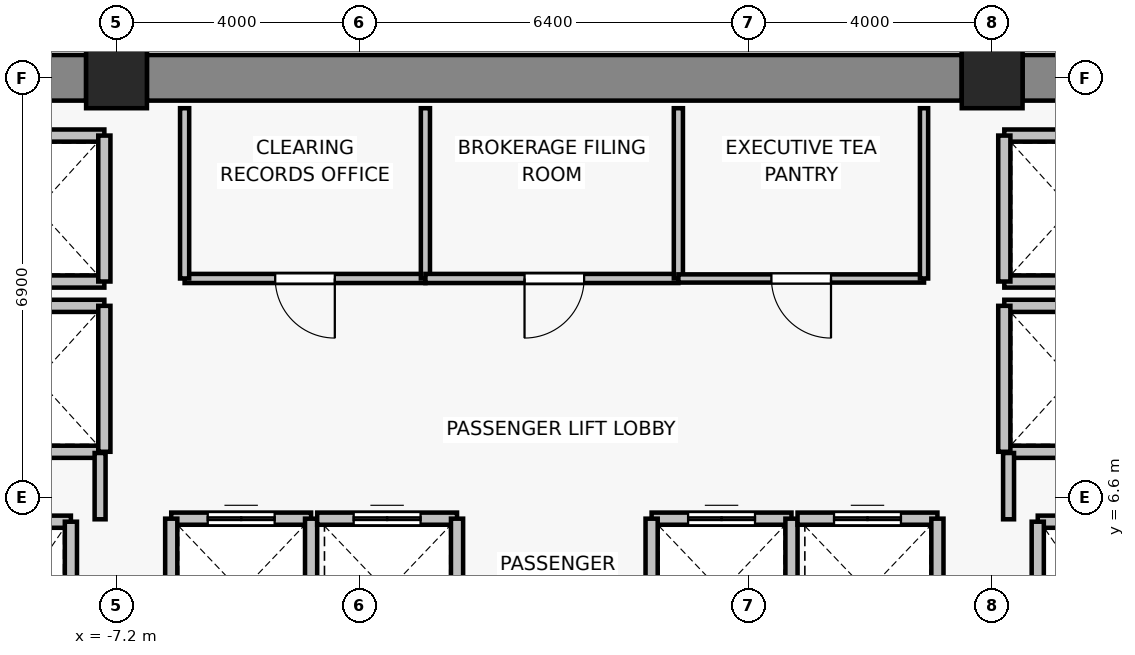
"""IFC4 building model, lengths in metres.
Left out: names, types, materials, properties, quantities, classifications, styles, units other than length and angle.
Written with IfcOpenShell. Run it as: python <this file> out.ifc"""

import sys

from ifc_helpers import new_model, si_unit, direction, frame, frame_2d, origin, origin_2d, place, context, subcontext, project, spatial, rectangle, extrude, source, transform, mapped, element, fill, save


model = new_model("IFC4")
c1 = context("Model", 3, precision=1e-05, world=origin(), true_north=direction((0.0, 1.0)))
c2 = subcontext(c1, "Body", "Model", "MODEL_VIEW")
j1 = project(units=[si_unit("LENGTHUNIT", "METRE"), si_unit("PLANEANGLEUNIT", "RADIAN")], contexts=[c1])
p1 = place(None, origin())
s1 = spatial("IfcSite", under=j1, at=p1, CompositionType="ELEMENT")
p2 = place(p1, origin())
s2 = spatial("IfcBuilding", under=s1, at=p2, CompositionType="ELEMENT")
p3 = place(p2, frame((0.0, 0.0, 175.9)))
s3 = spatial("IfcBuildingStorey", under=s2, at=p3, CompositionType="ELEMENT", Elevation=175.9)
for number, where, z_axis, x_axis in (
    (1, (-7.2, 13.5, 0.0), (0.0, 0.0, 1.0), (1.0, 0.0, 0.0)),
    (2, (7.2, 13.5, 0.0), (0.0, 0.0, 1.0), (1.0, 0.0, 0.0)),
):
    element("IfcColumn", number, at=place(p3, frame(where, z_axis=z_axis, x_axis=x_axis)), inside=s3, PredefinedType="COLUMN", context=c2, shape_type="SweptSolid", body=[
        extrude(rectangle(XDim=1.0, YDim=1.0, at=origin_2d()), origin(), (0.0, 0.0, 1.0), 3.3),
    ])
p4 = place(p3, frame((-13.9, 13.5, 0.0), z_axis=(0.0, 0.0, 1.0), x_axis=(1.0, 0.0, 0.0)))
e3 = element("IfcWall", 3, at=p4, inside=s3, PredefinedType="SHEAR", context=c2, shape_type="SweptSolid", body=[
    extrude(rectangle(XDim=6.2, YDim=0.75, at=frame_2d((3.1, 0.0))), origin(), (0.0, 0.0, 1.0), 3.075),
])
p5 = place(p3, frame((-6.7, 13.5, 0.0), z_axis=(0.0, 0.0, 1.0), x_axis=(1.0, 0.0, 0.0)))
e4 = element("IfcWall", 4, at=p5, inside=s3, PredefinedType="SHEAR", context=c2, shape_type="SweptSolid", body=[
    extrude(rectangle(XDim=13.4, YDim=0.75, at=frame_2d((6.7, 0.0))), origin(), (0.0, 0.0, 1.0), 3.075),
])
p6 = place(p3, frame((7.7, 13.5, 0.0), z_axis=(0.0, 0.0, 1.0), x_axis=(1.0, 0.0, 0.0)))
e5 = element("IfcWall", 5, at=p6, inside=s3, PredefinedType="SHEAR", context=c2, shape_type="SweptSolid", body=[
    extrude(rectangle(XDim=6.2, YDim=0.75, at=frame_2d((3.1, 0.0))), origin(), (0.0, 0.0, 1.0), 3.075),
])
p7 = place(p3, frame((-9.95, 6.2, 0.0), z_axis=(0.0, 0.0, 1.0), x_axis=(1.0, 0.0, 0.0)))
e6 = element("IfcWall", 6, at=p7, inside=s3, PredefinedType="SOLIDWALL", context=c2, shape_type="SweptSolid", body=[
    extrude(rectangle(XDim=2.0, YDim=0.2, at=frame_2d((1.0, 0.0))), origin(), (0.0, 0.0, 1.0), 3.075),
])
p8 = place(p3, frame((-7.95, 6.2, 0.0), z_axis=(0.0, 0.0, 1.0), x_axis=(0.0, -1.0, 0.0)))
e7 = element("IfcWall", 7, at=p8, inside=s3, PredefinedType="SOLIDWALL", context=c2, shape_type="SweptSolid", body=[
    extrude(rectangle(XDim=2.8, YDim=0.2, at=frame_2d((1.4, 0.0))), origin(), (0.0, 0.0, 1.0), 3.075),
])
p9 = place(p3, frame((7.95, 6.2, 0.0), z_axis=(0.0, 0.0, 1.0), x_axis=(1.0, 0.0, 0.0)))
e8 = element("IfcWall", 8, at=p9, inside=s3, PredefinedType="SOLIDWALL", context=c2, shape_type="SweptSolid", body=[
    extrude(rectangle(XDim=2.0, YDim=0.2, at=frame_2d((1.0, 0.0))), origin(), (0.0, 0.0, 1.0), 3.075),
])
p10 = place(p3, frame((7.95, 3.4, 0.0), z_axis=(0.0, 0.0, 1.0), x_axis=(0.0, 1.0, 0.0)))
e9 = element("IfcWall", 9, at=p10, inside=s3, PredefinedType="SOLIDWALL", context=c2, shape_type="SweptSolid", body=[
    extrude(rectangle(XDim=2.8, YDim=0.2, at=frame_2d((1.4, 0.0))), origin(), (0.0, 0.0, 1.0), 3.075),
])
p11 = place(p3, frame((-6.3, 6.25, 0.0), z_axis=(0.0, 0.0, 1.0), x_axis=(1.0, 0.0, 0.0)))
e10 = element("IfcWall", 10, at=p11, inside=s3, PredefinedType="SOLIDWALL", context=c2, shape_type="SweptSolid", body=[
    extrude(rectangle(XDim=2.3, YDim=0.2, at=frame_2d((1.15, 0.0))), origin(), (0.0, 0.0, 1.0), 3.075),
])
p12 = place(p11, frame((0.6, 0.0, 0.0)))
e11 = element("IfcOpeningElement", 11, at=p12, cuts=e10, PredefinedType="OPENING", context=c2, shape_type="SweptSolid", body=[
    extrude(rectangle(XDim=1.1, YDim=2.2, at=frame_2d((0.55, 1.1))), frame((0.0, 0.11, 0.0), z_axis=(0.0, -1.0, 0.0), x_axis=(1.0, 0.0, 0.0)), (0.0, 0.0, 1.0), 0.22),
])
for number, where, z_axis, x_axis in (
    (12, (-6.3, 3.85, 0.0), (0.0, 0.0, 1.0), (0.0, 1.0, 0.0)),
    (13, (-4.0, 6.25, 0.0), (0.0, 0.0, 1.0), (0.0, -1.0, 0.0)),
):
    element("IfcWall", number, at=place(p3, frame(where, z_axis=z_axis, x_axis=x_axis)), inside=s3, PredefinedType="SOLIDWALL", context=c2, shape_type="SweptSolid", body=[
        extrude(rectangle(XDim=2.4, YDim=0.2, at=frame_2d((1.2, 0.0))), origin(), (0.0, 0.0, 1.0), 3.075),
    ])
p13 = place(p3, frame((-3.9, 6.25, 0.0), z_axis=(0.0, 0.0, 1.0), x_axis=(1.0, 0.0, 0.0)))
e14 = element("IfcWall", 14, at=p13, inside=s3, PredefinedType="SOLIDWALL", context=c2, shape_type="SweptSolid", body=[
    extrude(rectangle(XDim=2.3, YDim=0.2, at=frame_2d((1.15, 0.0))), origin(), (0.0, 0.0, 1.0), 3.075),
])
p14 = place(p13, frame((0.6, 0.0, 0.0)))
e15 = element("IfcOpeningElement", 15, at=p14, cuts=e14, PredefinedType="OPENING", context=c2, shape_type="SweptSolid", body=[
    extrude(rectangle(XDim=1.1, YDim=2.2, at=frame_2d((0.55, 1.1))), frame((0.0, 0.11, 0.0), z_axis=(0.0, -1.0, 0.0), x_axis=(1.0, 0.0, 0.0)), (0.0, 0.0, 1.0), 0.22),
])
p15 = place(p3, frame((-1.6, 6.25, 0.0), z_axis=(0.0, 0.0, 1.0), x_axis=(0.0, -1.0, 0.0)))
e16 = element("IfcWall", 16, at=p15, inside=s3, PredefinedType="SOLIDWALL", context=c2, shape_type="SweptSolid", body=[
    extrude(rectangle(XDim=2.4, YDim=0.2, at=frame_2d((1.2, 0.0))), origin(), (0.0, 0.0, 1.0), 3.075),
])
p16 = place(p3, frame((1.6, 6.25, 0.0), z_axis=(0.0, 0.0, 1.0), x_axis=(1.0, 0.0, 0.0)))
e17 = element("IfcWall", 17, at=p16, inside=s3, PredefinedType="SOLIDWALL", context=c2, shape_type="SweptSolid", body=[
    extrude(rectangle(XDim=2.3, YDim=0.2, at=frame_2d((1.15, 0.0))), origin(), (0.0, 0.0, 1.0), 3.075),
])
p17 = place(p16, frame((0.6, 0.0, 0.0)))
e18 = element("IfcOpeningElement", 18, at=p17, cuts=e17, PredefinedType="OPENING", context=c2, shape_type="SweptSolid", body=[
    extrude(rectangle(XDim=1.1, YDim=2.2, at=frame_2d((0.55, 1.1))), frame((0.0, 0.11, 0.0), z_axis=(0.0, -1.0, 0.0), x_axis=(1.0, 0.0, 0.0)), (0.0, 0.0, 1.0), 0.22),
])
for number, where, z_axis, x_axis in (
    (19, (1.6, 3.85, 0.0), (0.0, 0.0, 1.0), (0.0, 1.0, 0.0)),
    (20, (3.9, 6.25, 0.0), (0.0, 0.0, 1.0), (0.0, -1.0, 0.0)),
):
    element("IfcWall", number, at=place(p3, frame(where, z_axis=z_axis, x_axis=x_axis)), inside=s3, PredefinedType="SOLIDWALL", context=c2, shape_type="SweptSolid", body=[
        extrude(rectangle(XDim=2.4, YDim=0.2, at=frame_2d((1.2, 0.0))), origin(), (0.0, 0.0, 1.0), 3.075),
    ])
p18 = place(p3, frame((4.0, 6.25, 0.0), z_axis=(0.0, 0.0, 1.0), x_axis=(1.0, 0.0, 0.0)))
e21 = element("IfcWall", 21, at=p18, inside=s3, PredefinedType="SOLIDWALL", context=c2, shape_type="SweptSolid", body=[
    extrude(rectangle(XDim=2.3, YDim=0.2, at=frame_2d((1.15, 0.0))), origin(), (0.0, 0.0, 1.0), 3.075),
])
p19 = place(p18, frame((0.6, 0.0, 0.0)))
e22 = element("IfcOpeningElement", 22, at=p19, cuts=e21, PredefinedType="OPENING", context=c2, shape_type="SweptSolid", body=[
    extrude(rectangle(XDim=1.1, YDim=2.2, at=frame_2d((0.55, 1.1))), frame((0.0, 0.11, 0.0), z_axis=(0.0, -1.0, 0.0), x_axis=(1.0, 0.0, 0.0)), (0.0, 0.0, 1.0), 0.22),
])
p20 = place(p3, frame((6.3, 6.25, 0.0), z_axis=(0.0, 0.0, 1.0), x_axis=(0.0, -1.0, 0.0)))
e23 = element("IfcWall", 23, at=p20, inside=s3, PredefinedType="SOLIDWALL", context=c2, shape_type="SweptSolid", body=[
    extrude(rectangle(XDim=2.4, YDim=0.2, at=frame_2d((1.2, 0.0))), origin(), (0.0, 0.0, 1.0), 3.075),
])
for number, where, z_axis, x_axis in (
    (24, (-7.4, 7.35, 0.0), (0.0, 0.0, 1.0), (-1.0, 0.0, 0.0)),
    (25, (-9.6, 9.75, 0.0), (0.0, 0.0, 1.0), (1.0, 0.0, 0.0)),
):
    element("IfcWall", number, at=place(p3, frame(where, z_axis=z_axis, x_axis=x_axis)), inside=s3, PredefinedType="SOLIDWALL", context=c2, shape_type="SweptSolid", body=[
        extrude(rectangle(XDim=2.2, YDim=0.2, at=frame_2d((1.1, 0.0))), origin(), (0.0, 0.0, 1.0), 2.565),
    ])
p21 = place(p3, frame((-7.4, 9.75, 0.0), z_axis=(0.0, 0.0, 1.0), x_axis=(0.0, -1.0, 0.0)))
e26 = element("IfcWall", 26, at=p21, inside=s3, PredefinedType="SOLIDWALL", context=c2, shape_type="SweptSolid", body=[
    extrude(rectangle(XDim=2.4, YDim=0.2, at=frame_2d((1.2, 0.0))), origin(), (0.0, 0.0, 1.0), 2.565),
])
for number, where, z_axis, x_axis in (
    (27, (-7.4, 10.15, 0.0), (0.0, 0.0, 1.0), (-1.0, 0.0, 0.0)),
    (28, (-9.6, 12.55, 0.0), (0.0, 0.0, 1.0), (1.0, 0.0, 0.0)),
):
    element("IfcWall", number, at=place(p3, frame(where, z_axis=z_axis, x_axis=x_axis)), inside=s3, PredefinedType="SOLIDWALL", context=c2, shape_type="SweptSolid", body=[
        extrude(rectangle(XDim=2.2, YDim=0.2, at=frame_2d((1.1, 0.0))), origin(), (0.0, 0.0, 1.0), 2.565),
    ])
p22 = place(p3, frame((-7.4, 12.55, 0.0), z_axis=(0.0, 0.0, 1.0), x_axis=(0.0, -1.0, 0.0)))
e29 = element("IfcWall", 29, at=p22, inside=s3, PredefinedType="SOLIDWALL", context=c2, shape_type="SweptSolid", body=[
    extrude(rectangle(XDim=2.4, YDim=0.2, at=frame_2d((1.2, 0.0))), origin(), (0.0, 0.0, 1.0), 2.565),
])
for number, where, z_axis, x_axis in (
    (30, (9.6, 7.35, 0.0), (0.0, 0.0, 1.0), (-1.0, 0.0, 0.0)),
    (31, (7.4, 9.75, 0.0), (0.0, 0.0, 1.0), (1.0, 0.0, 0.0)),
):
    element("IfcWall", number, at=place(p3, frame(where, z_axis=z_axis, x_axis=x_axis)), inside=s3, PredefinedType="SOLIDWALL", context=c2, shape_type="SweptSolid", body=[
        extrude(rectangle(XDim=2.2, YDim=0.2, at=frame_2d((1.1, 0.0))), origin(), (0.0, 0.0, 1.0), 2.565),
    ])
p23 = place(p3, frame((7.4, 7.35, 0.0), z_axis=(0.0, 0.0, 1.0), x_axis=(0.0, 1.0, 0.0)))
e32 = element("IfcWall", 32, at=p23, inside=s3, PredefinedType="SOLIDWALL", context=c2, shape_type="SweptSolid", body=[
    extrude(rectangle(XDim=2.4, YDim=0.2, at=frame_2d((1.2, 0.0))), origin(), (0.0, 0.0, 1.0), 2.565),
])
for number, where, z_axis, x_axis in (
    (33, (9.6, 10.15, 0.0), (0.0, 0.0, 1.0), (-1.0, 0.0, 0.0)),
    (34, (7.4, 12.55, 0.0), (0.0, 0.0, 1.0), (1.0, 0.0, 0.0)),
):
    element("IfcWall", number, at=place(p3, frame(where, z_axis=z_axis, x_axis=x_axis)), inside=s3, PredefinedType="SOLIDWALL", context=c2, shape_type="SweptSolid", body=[
        extrude(rectangle(XDim=2.2, YDim=0.2, at=frame_2d((1.1, 0.0))), origin(), (0.0, 0.0, 1.0), 2.565),
    ])
p24 = place(p3, frame((7.4, 10.15, 0.0), z_axis=(0.0, 0.0, 1.0), x_axis=(0.0, 1.0, 0.0)))
e35 = element("IfcWall", 35, at=p24, inside=s3, PredefinedType="SOLIDWALL", context=c2, shape_type="SweptSolid", body=[
    extrude(rectangle(XDim=2.4, YDim=0.2, at=frame_2d((1.2, 0.0))), origin(), (0.0, 0.0, 1.0), 2.565),
])
for number, where, z_axis, x_axis in (
    (36, (-7.47, 7.33, 0.0), (0.0, 0.0, 1.0), (0.0, -1.0, 0.0)),
    (37, (7.47, 6.24, 0.0), (0.0, 0.0, 1.0), (0.0, 1.0, 0.0)),
):
    element("IfcWall", number, at=place(p3, frame(where, z_axis=z_axis, x_axis=x_axis)), inside=s3, PredefinedType="PARTITIONING", context=c2, shape_type="SweptSolid", body=[
        extrude(rectangle(XDim=1.09, YDim=0.18, at=frame_2d((0.545, 0.0))), origin(), (0.0, 0.0, 1.0), 2.565),
    ])
p25 = place(p3, frame((-2.12, 10.2, 0.0), z_axis=(0.0, 0.0, 1.0), x_axis=(-1.0, 0.0, 0.0)))
e38 = element("IfcWall", 38, at=p25, inside=s3, PredefinedType="PARTITIONING", context=c2, shape_type="SweptSolid", body=[
    extrude(rectangle(XDim=3.96, YDim=0.15, at=frame_2d((1.98, 0.0))), origin(), (0.0, 0.0, 1.0), 3.075),
])
p26 = place(p25, frame((1.49, 0.0, 0.0)))
e39 = element("IfcOpeningElement", 39, at=p26, cuts=e38, PredefinedType="OPENING", context=c2, shape_type="SweptSolid", body=[
    extrude(rectangle(XDim=0.98, YDim=2.15, at=frame_2d((0.49, 1.075))), frame((0.0, 0.085, 0.0), z_axis=(0.0, -1.0, 0.0), x_axis=(1.0, 0.0, 0.0)), (0.0, 0.0, 1.0), 0.17),
])
for number, where, z_axis, x_axis in (
    (40, (-6.08, 10.2, 0.0), (0.0, 0.0, 1.0), (0.0, 1.0, 0.0)),
    (41, (-2.12, 13.0, 0.0), (0.0, 0.0, 1.0), (0.0, -1.0, 0.0)),
):
    element("IfcWall", number, at=place(p3, frame(where, z_axis=z_axis, x_axis=x_axis)), inside=s3, PredefinedType="PARTITIONING", context=c2, shape_type="SweptSolid", body=[
        extrude(rectangle(XDim=2.8, YDim=0.15, at=frame_2d((1.4, 0.0))), origin(), (0.0, 0.0, 1.0), 3.075),
    ])
p27 = place(p3, frame((2.04, 10.2, 0.0), z_axis=(0.0, 0.0, 1.0), x_axis=(-1.0, 0.0, 0.0)))
e42 = element("IfcWall", 42, at=p27, inside=s3, PredefinedType="PARTITIONING", context=c2, shape_type="SweptSolid", body=[
    extrude(rectangle(XDim=4.16, YDim=0.15, at=frame_2d((2.08, 0.0))), origin(), (0.0, 0.0, 1.0), 3.075),
])
p28 = place(p27, frame((1.55, 0.0, 0.0)))
e43 = element("IfcOpeningElement", 43, at=p28, cuts=e42, PredefinedType="OPENING", context=c2, shape_type="SweptSolid", body=[
    extrude(rectangle(XDim=0.98, YDim=2.15, at=frame_2d((0.49, 1.075))), frame((0.0, 0.085, 0.0), z_axis=(0.0, -1.0, 0.0), x_axis=(1.0, 0.0, 0.0)), (0.0, 0.0, 1.0), 0.17),
])
p29 = place(p3, frame((2.04, 13.0, 0.0), z_axis=(0.0, 0.0, 1.0), x_axis=(0.0, -1.0, 0.0)))
e44 = element("IfcWall", 44, at=p29, inside=s3, PredefinedType="PARTITIONING", context=c2, shape_type="SweptSolid", body=[
    extrude(rectangle(XDim=2.8, YDim=0.15, at=frame_2d((1.4, 0.0))), origin(), (0.0, 0.0, 1.0), 3.075),
])
p30 = place(p3, frame((6.08, 10.2, 0.0), z_axis=(0.0, 0.0, 1.0), x_axis=(-1.0, 0.0, 0.0)))
e45 = element("IfcWall", 45, at=p30, inside=s3, PredefinedType="PARTITIONING", context=c2, shape_type="SweptSolid", body=[
    extrude(rectangle(XDim=4.04, YDim=0.135, at=frame_2d((2.02, 0.0))), origin(), (0.0, 0.0, 1.0), 3.075),
])
p31 = place(p30, frame((1.53, 0.0, 0.0)))
e46 = element("IfcOpeningElement", 46, at=p31, cuts=e45, PredefinedType="OPENING", context=c2, shape_type="SweptSolid", body=[
    extrude(rectangle(XDim=0.98, YDim=2.15, at=frame_2d((0.49, 1.075))), frame((0.0, 0.077, 0.0), z_axis=(0.0, -1.0, 0.0), x_axis=(1.0, 0.0, 0.0)), (0.0, 0.0, 1.0), 0.155),
])
p32 = place(p3, frame((6.08, 13.0, 0.0), z_axis=(0.0, 0.0, 1.0), x_axis=(0.0, -1.0, 0.0)))
e47 = element("IfcWall", 47, at=p32, inside=s3, PredefinedType="PARTITIONING", context=c2, shape_type="SweptSolid", body=[
    extrude(rectangle(XDim=2.8, YDim=0.135, at=frame_2d((1.4, 0.0))), origin(), (0.0, 0.0, 1.0), 3.075),
])
m1 = source(origin(), c2, "Body", "SweptSolid", [
    extrude(rectangle(XDim=1.1, YDim=2.2, at=frame_2d((0.55, 1.1))), frame((0.0, 0.025, 0.0), z_axis=(0.0, -1.0, 0.0), x_axis=(1.0, 0.0, 0.0)), (0.0, 0.0, 1.0), 0.05),
])
p33 = place(p12, origin())
e48 = element("IfcDoor", 48, at=p33, inside=s3, OperationType="DOUBLE_DOOR_SLIDING", PredefinedType="DOOR", context=c2, shape_type="MappedRepresentation", body=[
    mapped(m1, transform((0.0, 0.0, 0.0), x_axis=(1.0, 0.0, 0.0), y_axis=(0.0, 1.0, 0.0), z_axis=(0.0, 0.0, 1.0), scale=1.0)),
])
fill(e11, e48)
p34 = place(p14, origin())
e49 = element("IfcDoor", 49, at=p34, inside=s3, OperationType="DOUBLE_DOOR_SLIDING", PredefinedType="DOOR", context=c2, shape_type="MappedRepresentation", body=[
    mapped(m1, transform((0.0, 0.0, 0.0), x_axis=(1.0, 0.0, 0.0), y_axis=(0.0, 1.0, 0.0), z_axis=(0.0, 0.0, 1.0), scale=1.0)),
])
fill(e15, e49)
p35 = place(p17, origin())
e50 = element("IfcDoor", 50, at=p35, inside=s3, OperationType="DOUBLE_DOOR_SLIDING", PredefinedType="DOOR", context=c2, shape_type="MappedRepresentation", body=[
    mapped(m1, transform((0.0, 0.0, 0.0), x_axis=(1.0, 0.0, 0.0), y_axis=(0.0, 1.0, 0.0), z_axis=(0.0, 0.0, 1.0), scale=1.0)),
])
fill(e18, e50)
p36 = place(p19, origin())
e51 = element("IfcDoor", 51, at=p36, inside=s3, OperationType="DOUBLE_DOOR_SLIDING", PredefinedType="DOOR", context=c2, shape_type="MappedRepresentation", body=[
    mapped(m1, transform((0.0, 0.0, 0.0), x_axis=(1.0, 0.0, 0.0), y_axis=(0.0, 1.0, 0.0), z_axis=(0.0, 0.0, 1.0), scale=1.0)),
])
fill(e22, e51)
m2 = source(origin(), c2, "Body", "SweptSolid", [
    extrude(rectangle(XDim=0.98, YDim=2.15, at=frame_2d((0.49, 1.075))), frame((0.0, 0.025, 0.0), z_axis=(0.0, -1.0, 0.0), x_axis=(1.0, 0.0, 0.0)), (0.0, 0.0, 1.0), 0.05),
])
p37 = place(p26, origin())
e52 = element("IfcDoor", 52, at=p37, inside=s3, OperationType="SINGLE_SWING_LEFT", PredefinedType="DOOR", context=c2, shape_type="MappedRepresentation", body=[
    mapped(m2, transform((0.0, 0.0, 0.0), x_axis=(1.0, 0.0, 0.0), y_axis=(0.0, 1.0, 0.0), z_axis=(0.0, 0.0, 1.0), scale=1.0)),
])
fill(e39, e52)
p38 = place(p28, origin())
e53 = element("IfcDoor", 53, at=p38, inside=s3, OperationType="SINGLE_SWING_RIGHT", PredefinedType="DOOR", context=c2, shape_type="MappedRepresentation", body=[
    mapped(m2, transform((0.0, 0.0, 0.0), x_axis=(1.0, 0.0, 0.0), y_axis=(0.0, 1.0, 0.0), z_axis=(0.0, 0.0, 1.0), scale=1.0)),
])
fill(e43, e53)
p39 = place(p31, origin())
e54 = element("IfcDoor", 54, at=p39, inside=s3, OperationType="SINGLE_SWING_LEFT", PredefinedType="DOOR", context=c2, shape_type="MappedRepresentation", body=[
    mapped(m2, transform((0.0, 0.0, 0.0), x_axis=(1.0, 0.0, 0.0), y_axis=(0.0, 1.0, 0.0), z_axis=(0.0, 0.0, 1.0), scale=1.0)),
])
fill(e46, e54)
save(model, sys.argv[1])
